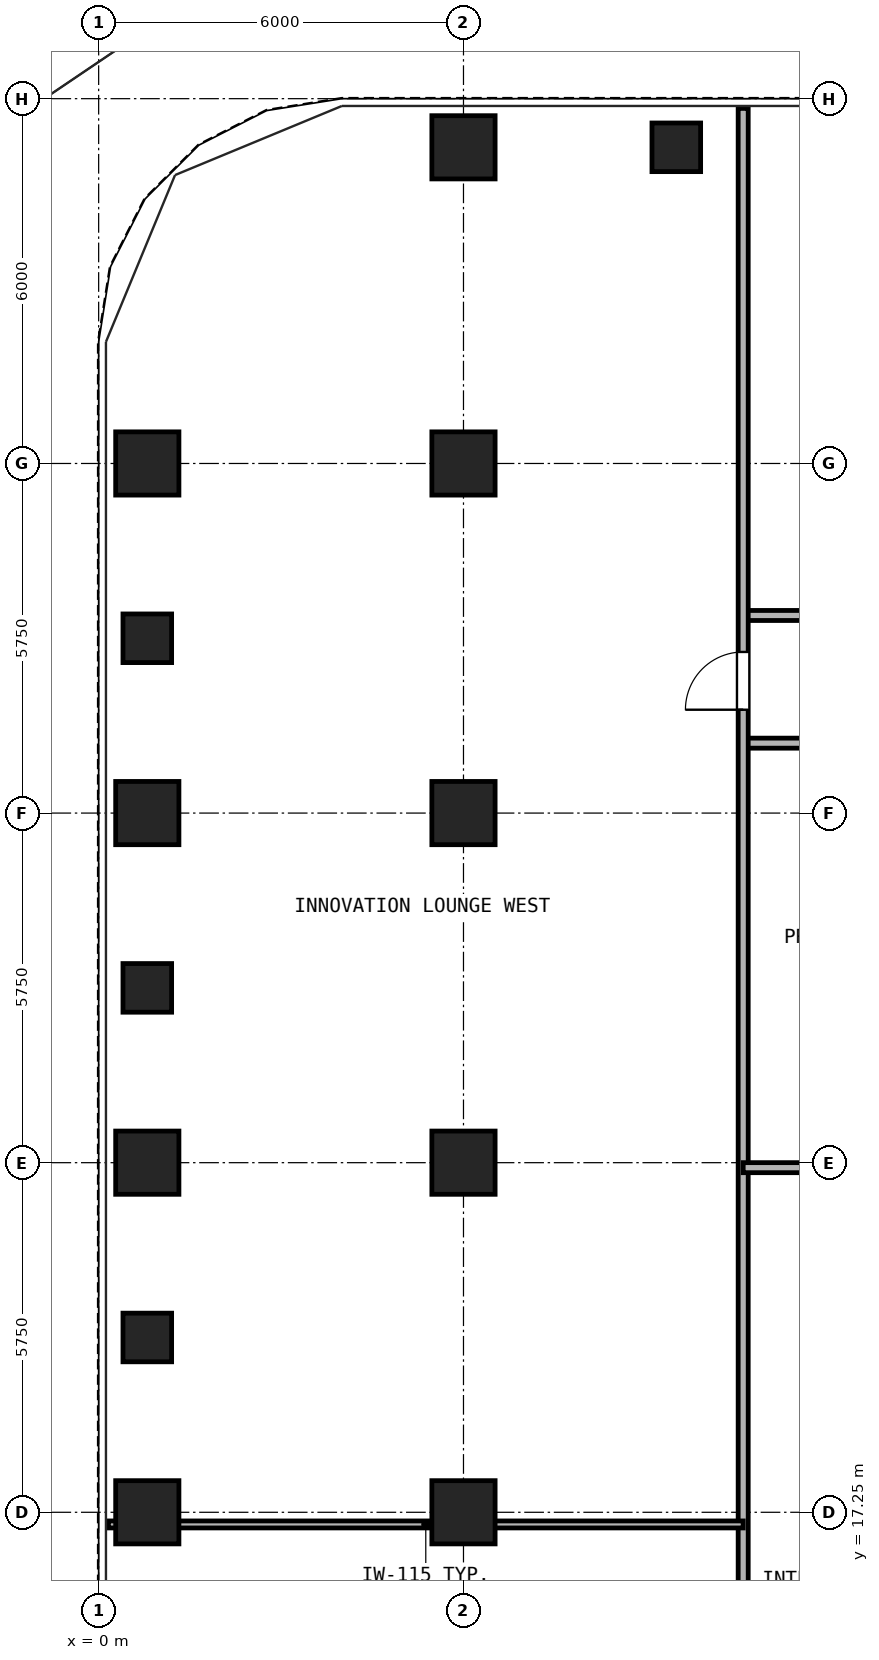
"""IFC4 building model, lengths in metres.
Left out: names, types, materials, properties, quantities, classifications, styles, units other than length and angle.
Written with IfcOpenShell. Run it as: python <this file> out.ifc"""

import sys

from ifc_helpers import new_model, si_unit, direction, frame, frame_2d, origin, origin_2d, place, context, subcontext, project, spatial, rectangle, hollow_rectangle, extrude, source, transform, mapped, element, fill, save


model = new_model("IFC4")
c1 = context("Model", 3, precision=1e-05, world=origin(), true_north=direction((0.0, 1.0)))
c2 = subcontext(c1, "Body", "Model", "MODEL_VIEW")
j1 = project(units=[si_unit("LENGTHUNIT", "METRE"), si_unit("PLANEANGLEUNIT", "RADIAN")], contexts=[c1])
p1 = place(None, origin())
s1 = spatial("IfcSite", under=j1, at=p1, CompositionType="ELEMENT")
p2 = place(p1, origin())
s2 = spatial("IfcBuilding", under=s1, at=p2, CompositionType="ELEMENT")
p3 = place(p2, frame((0.0, 0.0, 47.7)))
s3 = spatial("IfcBuildingStorey", under=s2, at=p3, CompositionType="ELEMENT", Elevation=47.7)
m1 = source(origin(), c2, "Body", "SweptSolid", [
    extrude(hollow_rectangle(XDim=1.04, YDim=1.04, WallThickness=0.065, at=origin_2d()), origin(), (0.0, 0.0, 1.0), 3.32),
])
for number, where, z_axis, x_axis in (
    (1, (6.0, 39.7, 0.0), (0.0, 0.0, 1.0), (1.0, 0.0, 0.0)),
    (2, (0.8, 17.25, 0.0), (0.0, 0.0, 1.0), (1.0, 0.0, 0.0)),
    (3, (0.8, 23.0, 0.0), (0.0, 0.0, 1.0), (1.0, 0.0, 0.0)),
    (4, (0.8, 28.75, 0.0), (0.0, 0.0, 1.0), (1.0, 0.0, 0.0)),
    (5, (0.8, 34.5, 0.0), (0.0, 0.0, 1.0), (1.0, 0.0, 0.0)),
    (6, (6.0, 17.25, 0.0), (0.0, 0.0, 1.0), (1.0, 0.0, 0.0)),
    (7, (6.0, 23.0, 0.0), (0.0, 0.0, 1.0), (1.0, 0.0, 0.0)),
    (8, (6.0, 28.75, 0.0), (0.0, 0.0, 1.0), (1.0, 0.0, 0.0)),
    (9, (6.0, 34.5, 0.0), (0.0, 0.0, 1.0), (1.0, 0.0, 0.0)),
):
    element("IfcColumn", number, at=place(p3, frame(where, z_axis=z_axis, x_axis=x_axis)), inside=s3, PredefinedType="COLUMN", context=c2, shape_type="MappedRepresentation", body=[
        mapped(m1, transform((0.0, 0.0, 0.0), x_axis=(1.0, 0.0, 0.0), y_axis=(0.0, 1.0, 0.0), z_axis=(0.0, 0.0, 1.0), scale=1.0)),
    ])
m2 = source(origin(), c2, "Body", "SweptSolid", [
    extrude(hollow_rectangle(XDim=0.8, YDim=0.8, WallThickness=0.045, at=origin_2d()), origin(), (0.0, 0.0, 1.0), 3.32),
])
for number, where, z_axis, x_axis in (
    (10, (9.5, 39.7, 0.0), (0.0, 0.0, 1.0), (1.0, 0.0, 0.0)),
    (11, (0.8, 20.125, 0.0), (0.0, 0.0, 1.0), (1.0, 0.0, 0.0)),
    (12, (0.8, 25.875, 0.0), (0.0, 0.0, 1.0), (1.0, 0.0, 0.0)),
    (13, (0.8, 31.625, 0.0), (0.0, 0.0, 1.0), (1.0, 0.0, 0.0)),
):
    element("IfcColumn", number, at=place(p3, frame(where, z_axis=z_axis, x_axis=x_axis)), inside=s3, PredefinedType="COLUMN", context=c2, shape_type="MappedRepresentation", body=[
        mapped(m2, transform((0.0, 0.0, 0.0), x_axis=(1.0, 0.0, 0.0), y_axis=(0.0, 1.0, 0.0), z_axis=(0.0, 0.0, 1.0), scale=1.0)),
    ])
p4 = place(p3, frame((10.6, 32.0, 0.0), z_axis=(0.0, 0.0, 1.0), x_axis=(1.0, 0.0, 0.0)))
e14 = element("IfcWall", 14, at=p4, inside=s3, PredefinedType="PARTITIONING", context=c2, shape_type="SweptSolid", body=[
    extrude(rectangle(XDim=25.8, YDim=0.165, at=frame_2d((12.9, 0.0))), origin(), (0.0, 0.0, 1.0), 3.32),
])
p5 = place(p4, frame((3.45, 0.0, 0.0)))
e15 = element("IfcOpeningElement", 15, at=p5, cuts=e14, PredefinedType="OPENING", context=c2, shape_type="SweptSolid", body=[
    extrude(rectangle(XDim=0.95, YDim=2.15, at=frame_2d((0.475, 1.075))), frame((0.0, 0.093, 0.0), z_axis=(0.0, -1.0, 0.0), x_axis=(1.0, 0.0, 0.0)), (0.0, 0.0, 1.0), 0.185),
])
p6 = place(p4, frame((10.9, 0.0, 0.0)))
e16 = element("IfcOpeningElement", 16, at=p6, cuts=e14, PredefinedType="OPENING", context=c2, shape_type="SweptSolid", body=[
    extrude(rectangle(XDim=0.95, YDim=2.15, at=frame_2d((0.475, 1.075))), frame((0.0, 0.093, 0.0), z_axis=(0.0, -1.0, 0.0), x_axis=(1.0, 0.0, 0.0)), (0.0, 0.0, 1.0), 0.185),
])
p7 = place(p4, frame((19.85, 0.0, 0.0)))
e17 = element("IfcOpeningElement", 17, at=p7, cuts=e14, PredefinedType="OPENING", context=c2, shape_type="SweptSolid", body=[
    extrude(rectangle(XDim=0.95, YDim=2.15, at=frame_2d((0.475, 1.075))), frame((0.0, 0.093, 0.0), z_axis=(0.0, -1.0, 0.0), x_axis=(1.0, 0.0, 0.0)), (0.0, 0.0, 1.0), 0.185),
])
p8 = place(p3, frame((10.6, 29.9, 0.0), z_axis=(0.0, 0.0, 1.0), x_axis=(1.0, 0.0, 0.0)))
e18 = element("IfcWall", 18, at=p8, inside=s3, PredefinedType="PARTITIONING", context=c2, shape_type="SweptSolid", body=[
    extrude(rectangle(XDim=5.7, YDim=0.165, at=frame_2d((2.85, 0.0))), origin(), (0.0, 0.0, 1.0), 3.32),
])
p9 = place(p3, frame((10.6, 0.16, 0.0), z_axis=(0.0, 0.0, 1.0), x_axis=(0.0, 1.0, 0.0)))
e19 = element("IfcWall", 19, at=p9, inside=s3, PredefinedType="PARTITIONING", context=c2, shape_type="SweptSolid", body=[
    extrude(rectangle(XDim=40.18, YDim=0.165, at=frame_2d((20.09, 0.0))), origin(), (0.0, 0.0, 1.0), 3.32),
])
p10 = place(p9, frame((8.49, 0.0, 0.0)))
e20 = element("IfcOpeningElement", 20, at=p10, cuts=e19, PredefinedType="OPENING", context=c2, shape_type="SweptSolid", body=[
    extrude(rectangle(XDim=0.95, YDim=2.15, at=frame_2d((0.475, 1.075))), frame((0.0, 0.093, 0.0), z_axis=(0.0, -1.0, 0.0), x_axis=(1.0, 0.0, 0.0)), (0.0, 0.0, 1.0), 0.185),
])
p11 = place(p9, frame((30.29, 0.0, 0.0)))
e21 = element("IfcOpeningElement", 21, at=p11, cuts=e19, PredefinedType="OPENING", context=c2, shape_type="SweptSolid", body=[
    extrude(rectangle(XDim=0.95, YDim=2.15, at=frame_2d((0.475, 1.075))), frame((0.0, 0.093, 0.0), z_axis=(0.0, -1.0, 0.0), x_axis=(1.0, 0.0, 0.0)), (0.0, 0.0, 1.0), 0.185),
])
p12 = place(p3, frame((0.16, 17.05, 0.0), z_axis=(0.0, 0.0, 1.0), x_axis=(1.0, 0.0, 0.0)))
e22 = element("IfcWall", 22, at=p12, inside=s3, PredefinedType="PARTITIONING", context=c2, shape_type="SweptSolid", body=[
    extrude(rectangle(XDim=10.44, YDim=0.115, at=frame_2d((5.22, 0.0))), origin(), (0.0, 0.0, 1.0), 2.539),
])
p13 = place(p3, frame((10.6, 22.918, 0.0), z_axis=(0.0, 0.0, 1.0), x_axis=(1.0, 0.0, 0.0)))
e23 = element("IfcWall", 23, at=p13, inside=s3, PredefinedType="PARTITIONING", context=c2, shape_type="SweptSolid", body=[
    extrude(rectangle(XDim=5.7, YDim=0.165, at=frame_2d((2.85, 0.0))), origin(), (0.0, 0.0, 1.0), 2.539),
])
p14 = place(p11, frame((0.95, 0.0, 0.0), z_axis=(0.0, 0.0, 1.0), x_axis=(-1.0, 0.0, 0.0)))
e24 = element("IfcDoor", 24, at=p14, inside=s3, OperationType="SINGLE_SWING_LEFT", PredefinedType="DOOR", context=c2, shape_type="SweptSolid", body=[
    extrude(rectangle(XDim=0.95, YDim=2.15, at=frame_2d((0.475, 1.075))), frame((0.0, 0.025, 0.0), z_axis=(0.0, -1.0, 0.0), x_axis=(1.0, 0.0, 0.0)), (0.0, 0.0, 1.0), 0.05),
])
fill(e21, e24)
save(model, sys.argv[1])
